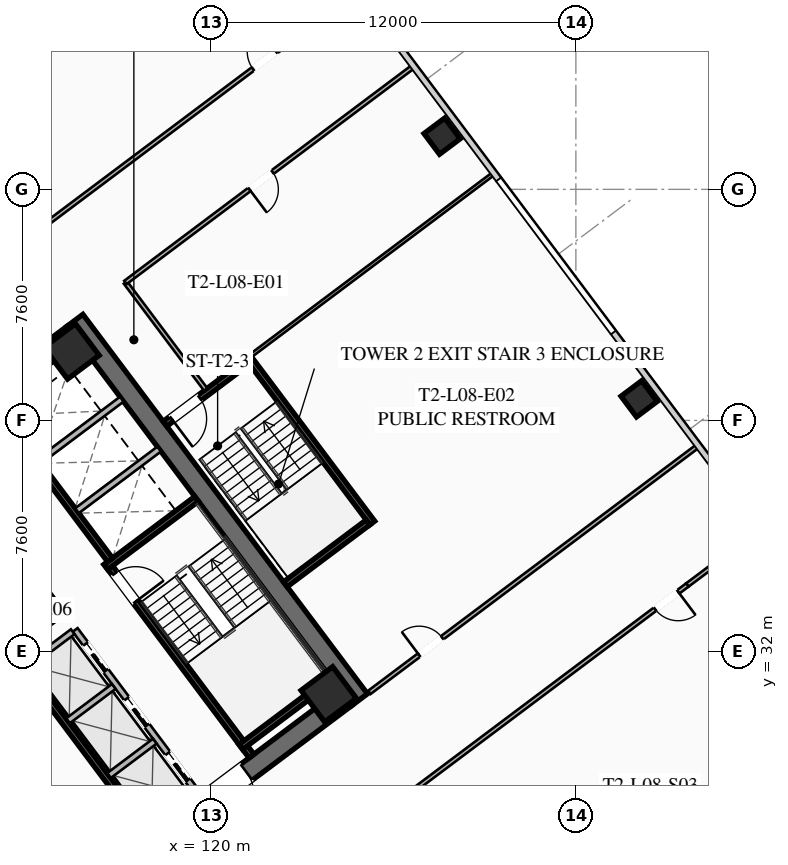
"""IFC4 building model, lengths in metres.
Left out: names, types, materials, properties, quantities, classifications, styles, units other than length and angle.
Written with IfcOpenShell. Run it as: python <this file> out.ifc"""

import sys

from ifc_helpers import new_model, si_unit, direction, frame, frame_2d, origin, origin_2d, place, context, subcontext, project, spatial, rectangle, hollow_rectangle, extrude, element, fill, save


model = new_model("IFC4")
c1 = context("Model", 3, precision=1e-05, world=origin(), true_north=direction((0.0, 1.0)))
c2 = subcontext(c1, "Body", "Model", "MODEL_VIEW")
j1 = project(units=[si_unit("LENGTHUNIT", "METRE"), si_unit("PLANEANGLEUNIT", "RADIAN")], contexts=[c1])
p1 = place(None, origin())
s1 = spatial("IfcSite", under=j1, at=p1, CompositionType="ELEMENT")
p2 = place(p1, origin())
s2 = spatial("IfcBuilding", under=s1, at=p2, CompositionType="ELEMENT")
p3 = place(p2, frame((0.0, 0.0, 35.25)))
s3 = spatial("IfcBuildingStorey", under=s2, at=p3, CompositionType="ELEMENT", Elevation=35.25)
p4 = place(p3, frame((115.524, 42.893, 0.0), z_axis=(0.0, 0.0, 1.0), x_axis=(0.600005007985, -0.799996243986, 0.0)))
e1 = element("IfcWall", 1, at=p4, inside=s3, PredefinedType="SHEAR", context=c2, shape_type="SweptSolid", body=[
    extrude(rectangle(XDim=15.6, YDim=0.65, at=frame_2d((7.8, 0.0))), origin(), (0.0, 0.0, 1.0), 3.55),
])
p5 = place(p3, frame((124.429, 30.478, 0.0), z_axis=(0.0, 0.0, 1.0), x_axis=(-0.799998028465, -0.600002628705, 0.0)))
e2 = element("IfcWall", 2, at=p5, inside=s3, PredefinedType="SHEAR", context=c2, shape_type="SweptSolid", body=[
    extrude(rectangle(XDim=14.86, YDim=0.65, at=frame_2d((7.43, 0.0))), origin(), (0.0, 0.0, 1.0), 3.55),
])
p6 = place(p5, frame((9.13, 0.0, 0.0)))
e3 = element("IfcOpeningElement", 3, at=p6, cuts=e2, PredefinedType="OPENING", context=c2, shape_type="SweptSolid", body=[
    extrude(rectangle(XDim=1.25, YDim=2.25, at=frame_2d((0.625, 1.125))), frame((0.0, 0.335, 0.0), z_axis=(0.0, -1.0, 0.0), x_axis=(1.0, 0.0, 0.0)), (0.0, 0.0, 1.0), 0.67),
])
p7 = place(p5, frame((4.08, 0.0, 0.0)))
e4 = element("IfcOpeningElement", 4, at=p7, cuts=e2, PredefinedType="OPENING", context=c2, shape_type="SweptSolid", body=[
    extrude(rectangle(XDim=1.25, YDim=2.25, at=frame_2d((0.625, 1.125))), frame((0.0, 0.335, 0.0), z_axis=(0.0, -1.0, 0.0), x_axis=(1.0, 0.0, 0.0)), (0.0, 0.0, 1.0), 0.67),
])
p8 = place(p3, frame((103.571, 33.522, 0.0), z_axis=(0.0, 0.0, 1.0), x_axis=(0.799998028465, 0.600002628705, 0.0)))
e5 = element("IfcWall", 5, at=p8, inside=s3, PredefinedType="SHEAR", context=c2, shape_type="SweptSolid", body=[
    extrude(rectangle(XDim=14.86, YDim=0.65, at=frame_2d((7.43, 0.0))), origin(), (0.0, 0.0, 1.0), 3.55),
])
p9 = place(p8, frame((4.48, 0.0, 0.0)))
e6 = element("IfcOpeningElement", 6, at=p9, cuts=e5, PredefinedType="OPENING", context=c2, shape_type="SweptSolid", body=[
    extrude(rectangle(XDim=1.25, YDim=2.25, at=frame_2d((0.625, 1.125))), frame((0.0, 0.335, 0.0), z_axis=(0.0, -1.0, 0.0), x_axis=(1.0, 0.0, 0.0)), (0.0, 0.0, 1.0), 0.67),
])
p10 = place(p8, frame((9.53, 0.0, 0.0)))
e7 = element("IfcOpeningElement", 7, at=p10, cuts=e5, PredefinedType="OPENING", context=c2, shape_type="SweptSolid", body=[
    extrude(rectangle(XDim=1.25, YDim=2.25, at=frame_2d((0.625, 1.125))), frame((0.0, 0.335, 0.0), z_axis=(0.0, -1.0, 0.0), x_axis=(1.0, 0.0, 0.0)), (0.0, 0.0, 1.0), 0.67),
])
for number, where, z_axis, x_axis in (
    (8, (123.87, 30.59, 0.0), (0.0, 0.0, 1.0), (0.8, 0.6, 0.0)),
    (9, (115.41, 41.87, 0.0), (0.0, 0.0, 1.0), (0.8, 0.6, 0.0)),
):
    element("IfcColumn", number, at=place(p3, frame(where, z_axis=z_axis, x_axis=x_axis)), inside=s3, PredefinedType="COLUMN", context=c2, shape_type="SweptSolid", body=[
        extrude(hollow_rectangle(XDim=1.3, YDim=1.3, WallThickness=0.05, at=origin_2d()), origin(), (0.0, 0.0, 1.0), 3.35),
    ])
for number, where, z_axis, x_axis in (
    (10, (134.08, 40.31, 0.0), (0.0, 0.0, 1.0), (0.8, 0.6, 0.0)),
    (11, (127.6, 48.95, 0.0), (0.0, 0.0, 1.0), (0.8, 0.6, 0.0)),
):
    element("IfcColumn", number, at=place(p3, frame(where, z_axis=z_axis, x_axis=x_axis)), inside=s3, PredefinedType="COLUMN", context=c2, shape_type="SweptSolid", body=[
        extrude(hollow_rectangle(XDim=0.85, YDim=0.85, WallThickness=0.035, at=origin_2d()), origin(), (0.0, 0.0, 1.0), 3.35),
    ])
p11 = place(p3, frame((116.56, 34.92, 0.0), z_axis=(0.0, 0.0, 1.0), x_axis=(0.600009827119, -0.799992629566, 0.0)))
e12 = element("IfcWall", 12, at=p11, inside=s3, PredefinedType="SHEAR", context=c2, shape_type="SweptSolid", body=[
    extrude(rectangle(XDim=7.95, YDim=0.2, at=frame_2d((3.975, 0.0))), origin(), (0.0, 0.0, 1.0), 3.35),
])
p12 = place(p11, frame((0.45, 0.0, 0.0)))
e13 = element("IfcOpeningElement", 13, at=p12, cuts=e12, PredefinedType="OPENING", context=c2, shape_type="SweptSolid", body=[
    extrude(rectangle(XDim=1.15, YDim=2.2, at=frame_2d((0.575, 1.1))), frame((0.0, 0.11, 0.0), z_axis=(0.0, -1.0, 0.0), x_axis=(1.0, 0.0, 0.0)), (0.0, 0.0, 1.0), 0.22),
])
for number, where, z_axis, x_axis in (
    (14, (116.54, 34.78, 0.0), (0.0, 0.0, 1.0), (0.8, 0.6, 0.0)),
    (15, (120.98, 28.86, 0.0), (0.0, 0.0, 1.0), (0.8, 0.6, 0.0)),
):
    element("IfcWall", number, at=place(p3, frame(where, z_axis=z_axis, x_axis=x_axis)), inside=s3, PredefinedType="SHEAR", context=c2, shape_type="SweptSolid", body=[
        extrude(rectangle(XDim=3.73, YDim=0.2, at=frame_2d((1.865, 0.0))), origin(), (0.0, 0.0, 1.0), 3.35),
    ])
p13 = place(p3, frame((117.938, 26.016, 0.0), z_axis=(0.0, 0.0, 1.0), x_axis=(-0.600005463273, 0.799995902516, 0.0)))
e16 = element("IfcWall", 16, at=p13, inside=s3, PredefinedType="SHEAR", context=c2, shape_type="SweptSolid", body=[
    extrude(rectangle(XDim=14.3, YDim=0.2, at=frame_2d((7.15, 0.0))), origin(), (0.0, 0.0, 1.0), 3.35),
])
p14 = place(p3, frame((115.13, 23.91, 0.0), z_axis=(0.0, 0.0, 1.0), x_axis=(-0.599975393228, 0.800018454488, 0.0)))
e17 = element("IfcWall", 17, at=p14, inside=s3, PredefinedType="SHEAR", context=c2, shape_type="SweptSolid", body=[
    extrude(rectangle(XDim=6.35, YDim=0.2, at=frame_2d((3.175, 0.0))), origin(), (0.0, 0.0, 1.0), 3.35),
])
p15 = place(p14, frame((4.775, 0.0, 0.0)))
e18 = element("IfcOpeningElement", 18, at=p15, cuts=e17, PredefinedType="OPENING", context=c2, shape_type="SweptSolid", body=[
    extrude(rectangle(XDim=1.3, YDim=2.25, at=frame_2d((0.65, 1.125))), frame((0.0, 0.11, 0.0), z_axis=(0.0, -1.0, 0.0), x_axis=(1.0, 0.0, 0.0)), (0.0, 0.0, 1.0), 0.22),
])
p16 = place(p14, frame((2.775, 0.0, 0.0)))
e19 = element("IfcOpeningElement", 19, at=p16, cuts=e17, PredefinedType="OPENING", context=c2, shape_type="SweptSolid", body=[
    extrude(rectangle(XDim=1.3, YDim=2.25, at=frame_2d((0.65, 1.125))), frame((0.0, 0.11, 0.0), z_axis=(0.0, -1.0, 0.0), x_axis=(1.0, 0.0, 0.0)), (0.0, 0.0, 1.0), 0.22),
])
p17 = place(p14, frame((0.575, 0.0, 0.0)))
e20 = element("IfcOpeningElement", 20, at=p17, cuts=e17, PredefinedType="OPENING", context=c2, shape_type="SweptSolid", body=[
    extrude(rectangle(XDim=1.3, YDim=2.25, at=frame_2d((0.65, 1.125))), frame((0.0, 0.11, 0.0), z_axis=(0.0, -1.0, 0.0), x_axis=(1.0, 0.0, 0.0)), (0.0, 0.0, 1.0), 0.22),
])
p18 = place(p3, frame((112.87, 40.09, 0.0), z_axis=(0.0, 0.0, 1.0), x_axis=(0.599975393228, -0.800018454488, 0.0)))
e21 = element("IfcWall", 21, at=p18, inside=s3, PredefinedType="SHEAR", context=c2, shape_type="SweptSolid", body=[
    extrude(rectangle(XDim=6.35, YDim=0.2, at=frame_2d((3.175, 0.0))), origin(), (0.0, 0.0, 1.0), 3.35),
])
for number, where, z_axis, x_axis in (
    (22, (115.59, 36.63, 0.0), (0.0, 0.0, 1.0), (0.8, 0.6, 0.0)),
    (23, (114.36, 38.27, 0.0), (0.0, 0.0, 1.0), (0.8, 0.6, 0.0)),
):
    element("IfcWall", number, at=place(p3, frame(where, z_axis=z_axis, x_axis=x_axis)), inside=s3, PredefinedType="SOLIDWALL", context=c2, shape_type="SweptSolid", body=[
        extrude(rectangle(XDim=3.38, YDim=0.2, at=frame_2d((1.69, 0.0))), origin(), (0.0, 0.0, 1.0), 3.35),
    ])
p19 = place(p3, frame((119.61, 27.27, 0.0), z_axis=(0.0, 0.0, 1.0), x_axis=(-0.600011488909, 0.79999138319, 0.0)))
e24 = element("IfcWall", 24, at=p19, inside=s3, PredefinedType="SOLIDWALL", context=c2, shape_type="SweptSolid", body=[
    extrude(rectangle(XDim=6.8, YDim=0.2, at=frame_2d((3.4, 0.0))), origin(), (0.0, 0.0, 1.0), 3.35),
])
p20 = place(p19, frame((0.625, 0.0, 0.0)))
e25 = element("IfcOpeningElement", 25, at=p20, cuts=e24, PredefinedType="OPENING", context=c2, shape_type="SweptSolid", body=[
    extrude(rectangle(XDim=1.1, YDim=2.2, at=frame_2d((0.55, 1.1))), frame((0.0, 0.11, 0.0), z_axis=(0.0, -1.0, 0.0), x_axis=(1.0, 0.0, 0.0)), (0.0, 0.0, 1.0), 0.22),
])
p21 = place(p19, frame((2.875, 0.0, 0.0)))
e26 = element("IfcOpeningElement", 26, at=p21, cuts=e24, PredefinedType="OPENING", context=c2, shape_type="SweptSolid", body=[
    extrude(rectangle(XDim=1.1, YDim=2.2, at=frame_2d((0.55, 1.1))), frame((0.0, 0.11, 0.0), z_axis=(0.0, -1.0, 0.0), x_axis=(1.0, 0.0, 0.0)), (0.0, 0.0, 1.0), 0.22),
])
p22 = place(p19, frame((5.125, 0.0, 0.0)))
e27 = element("IfcOpeningElement", 27, at=p22, cuts=e24, PredefinedType="OPENING", context=c2, shape_type="SweptSolid", body=[
    extrude(rectangle(XDim=1.1, YDim=2.2, at=frame_2d((0.55, 1.1))), frame((0.0, 0.11, 0.0), z_axis=(0.0, -1.0, 0.0), x_axis=(1.0, 0.0, 0.0)), (0.0, 0.0, 1.0), 0.22),
])
p23 = place(p3, frame((116.646, 27.922, 0.0), z_axis=(0.0, 0.0, 1.0), x_axis=(0.8, 0.6, 0.0)))
e28 = element("IfcWall", 28, at=p23, inside=s3, PredefinedType="SOLIDWALL", context=c2, shape_type="SweptSolid", body=[
    extrude(rectangle(XDim=1.88, YDim=0.2, at=frame_2d((0.94, 0.0))), origin(), (0.0, 0.0, 1.0), 3.35),
])
p24 = place(p3, frame((115.296, 29.722, 0.0), z_axis=(0.0, 0.0, 1.0), x_axis=(0.799984418148, 0.600020775241, 0.0)))
e29 = element("IfcWall", 29, at=p24, inside=s3, PredefinedType="SOLIDWALL", context=c2, shape_type="SweptSolid", body=[
    extrude(rectangle(XDim=1.88, YDim=0.2, at=frame_2d((0.94, 0.0))), origin(), (0.0, 0.0, 1.0), 3.35),
])
p25 = place(p3, frame((113.946, 31.522, 0.0), z_axis=(0.0, 0.0, 1.0), x_axis=(0.8, 0.6, 0.0)))
e30 = element("IfcWall", 30, at=p25, inside=s3, PredefinedType="SOLIDWALL", context=c2, shape_type="SweptSolid", body=[
    extrude(rectangle(XDim=1.88, YDim=0.2, at=frame_2d((0.94, 0.0))), origin(), (0.0, 0.0, 1.0), 3.35),
])
p26 = place(p3, frame((115.11, 33.27, 0.0), z_axis=(0.0, 0.0, 1.0), x_axis=(-0.600011488909, 0.79999138319, 0.0)))
e31 = element("IfcWall", 31, at=p26, inside=s3, PredefinedType="SOLIDWALL", context=c2, shape_type="SweptSolid", body=[
    extrude(rectangle(XDim=6.8, YDim=0.2, at=frame_2d((3.4, 0.0))), origin(), (0.0, 0.0, 1.0), 3.35),
])
p27 = place(p3, frame((113.526, 32.082, 0.0), z_axis=(0.0, 0.0, 1.0), x_axis=(0.800046745961, 0.599937666993, 0.0)))
e32 = element("IfcWall", 32, at=p27, inside=s3, PredefinedType="SOLIDWALL", context=c2, shape_type="SweptSolid", body=[
    extrude(rectangle(XDim=1.88, YDim=0.2, at=frame_2d((0.94, 0.0))), origin(), (0.0, 0.0, 1.0), 3.35),
])
p28 = place(p3, frame((125.304, 36.228, 0.0), z_axis=(0.0, 0.0, 1.0), x_axis=(-0.59998851072, 0.800008616831, 0.0)))
e33 = element("IfcWall", 33, at=p28, inside=s3, PredefinedType="SHEAR", context=c2, shape_type="SweptSolid", body=[
    extrude(rectangle(XDim=6.8, YDim=0.2, at=frame_2d((3.4, 0.0))), origin(), (0.0, 0.0, 1.0), 3.35),
])
p29 = place(p3, frame((121.204, 41.528, 0.0), z_axis=(0.0, 0.0, 1.0), x_axis=(-0.800017232136, -0.599977023131, 0.0)))
e34 = element("IfcWall", 34, at=p29, inside=s3, PredefinedType="SHEAR", context=c2, shape_type="SweptSolid", body=[
    extrude(rectangle(XDim=3.4, YDim=0.2, at=frame_2d((1.7, 0.0))), origin(), (0.0, 0.0, 1.0), 3.35),
])
p30 = place(p29, frame((1.975, 0.0, 0.0)))
e35 = element("IfcOpeningElement", 35, at=p30, cuts=e34, PredefinedType="OPENING", context=c2, shape_type="SweptSolid", body=[
    extrude(rectangle(XDim=1.15, YDim=2.2, at=frame_2d((0.575, 1.1))), frame((0.0, 0.11, 0.0), z_axis=(0.0, -1.0, 0.0), x_axis=(1.0, 0.0, 0.0)), (0.0, 0.0, 1.0), 0.22),
])
p31 = place(p3, frame((122.444, 34.208, 0.0), z_axis=(0.0, 0.0, 1.0), x_axis=(0.79999138319, 0.600011488909, 0.0)))
e36 = element("IfcWall", 36, at=p31, inside=s3, PredefinedType="SHEAR", context=c2, shape_type="SweptSolid", body=[
    extrude(rectangle(XDim=3.4, YDim=0.2, at=frame_2d((1.7, 0.0))), origin(), (0.0, 0.0, 1.0), 3.35),
])
p32 = place(p3, frame((119.824, 40.618, 0.0), z_axis=(0.0, 0.0, 1.0), x_axis=(-0.599982243973, 0.800013316712, 0.0)))
e37 = element("IfcWall", 37, at=p32, inside=s3, PredefinedType="PARTITIONING", context=c2, shape_type="SweptSolid", body=[
    extrude(rectangle(XDim=4.4, YDim=0.135, at=frame_2d((2.2, 0.0))), origin(), (0.0, 0.0, 1.0), 2.703),
])
p33 = place(p3, frame((98.516, 34.012, 0.0), z_axis=(0.0, 0.0, 1.0), x_axis=(0.799998035726, 0.600002619023, 0.0)))
e38 = element("IfcWall", 38, at=p33, inside=s3, PredefinedType="PARTITIONING", context=c2, shape_type="SweptSolid", body=[
    extrude(rectangle(XDim=29.83, YDim=0.135, at=frame_2d((14.915, 0.0))), origin(), (0.0, 0.0, 1.0), 2.703),
])
p34 = place(p33, frame((0.3, 0.0, 0.0)))
e39 = element("IfcOpeningElement", 39, at=p34, cuts=e38, PredefinedType="OPENING", context=c2, shape_type="SweptSolid", body=[
    extrude(rectangle(XDim=0.95, YDim=2.05, at=frame_2d((0.475, 1.025))), frame((0.0, 0.077, 0.0), z_axis=(0.0, -1.0, 0.0), x_axis=(1.0, 0.0, 0.0)), (0.0, 0.0, 1.0), 0.155),
])
p35 = place(p33, frame((10.829, 0.0, 0.0)))
e40 = element("IfcOpeningElement", 40, at=p35, cuts=e38, PredefinedType="OPENING", context=c2, shape_type="SweptSolid", body=[
    extrude(rectangle(XDim=0.95, YDim=2.05, at=frame_2d((0.475, 1.025))), frame((0.0, 0.077, 0.0), z_axis=(0.0, -1.0, 0.0), x_axis=(1.0, 0.0, 0.0)), (0.0, 0.0, 1.0), 0.155),
])
p36 = place(p33, frame((28.58, 0.0, 0.0)))
e41 = element("IfcOpeningElement", 41, at=p36, cuts=e38, PredefinedType="OPENING", context=c2, shape_type="SweptSolid", body=[
    extrude(rectangle(XDim=0.95, YDim=2.05, at=frame_2d((0.475, 1.025))), frame((0.0, 0.077, 0.0), z_axis=(0.0, -1.0, 0.0), x_axis=(1.0, 0.0, 0.0)), (0.0, 0.0, 1.0), 0.155),
])
p37 = place(p3, frame((135.67, 34.19, 0.0), z_axis=(0.0, 0.0, 1.0), x_axis=(-0.800000982127, -0.599998690494, 0.0)))
e42 = element("IfcWall", 42, at=p37, inside=s3, PredefinedType="PARTITIONING", context=c2, shape_type="SweptSolid", body=[
    extrude(rectangle(XDim=29.83, YDim=0.135, at=frame_2d((14.915, 0.0))), origin(), (0.0, 0.0, 1.0), 2.703),
])
p38 = place(p37, frame((28.5, 0.0, 0.0)))
e43 = element("IfcOpeningElement", 43, at=p38, cuts=e42, PredefinedType="OPENING", context=c2, shape_type="SweptSolid", body=[
    extrude(rectangle(XDim=0.95, YDim=2.05, at=frame_2d((0.475, 1.025))), frame((0.0, 0.077, 0.0), z_axis=(0.0, -1.0, 0.0), x_axis=(1.0, 0.0, 0.0)), (0.0, 0.0, 1.0), 0.155),
])
p39 = place(p37, frame((18.075, 0.0, 0.0)))
e44 = element("IfcOpeningElement", 44, at=p39, cuts=e42, PredefinedType="OPENING", context=c2, shape_type="SweptSolid", body=[
    extrude(rectangle(XDim=0.95, YDim=2.05, at=frame_2d((0.475, 1.025))), frame((0.0, 0.077, 0.0), z_axis=(0.0, -1.0, 0.0), x_axis=(1.0, 0.0, 0.0)), (0.0, 0.0, 1.0), 0.155),
])
p40 = place(p37, frame((0.38, 0.0, 0.0)))
e45 = element("IfcOpeningElement", 45, at=p40, cuts=e42, PredefinedType="OPENING", context=c2, shape_type="SweptSolid", body=[
    extrude(rectangle(XDim=0.95, YDim=2.05, at=frame_2d((0.475, 1.025))), frame((0.0, 0.077, 0.0), z_axis=(0.0, -1.0, 0.0), x_axis=(1.0, 0.0, 0.0)), (0.0, 0.0, 1.0), 0.155),
])
p41 = place(p3, frame((135.67, 34.19, 0.0), z_axis=(0.0, 0.0, 1.0), x_axis=(0.799990331366, 0.600012891296, 0.0)))
e46 = element("IfcWall", 46, at=p41, inside=s3, PredefinedType="PARTITIONING", context=c2, shape_type="SweptSolid", body=[
    extrude(rectangle(XDim=3.03, YDim=0.135, at=frame_2d((1.515, 0.0))), origin(), (0.0, 0.0, 1.0), 2.703),
])
p42 = place(p3, frame((126.664, 51.248, 0.0), z_axis=(0.0, 0.0, 1.0), x_axis=(-0.799995055373, -0.600006592779, 0.0)))
e47 = element("IfcWall", 47, at=p42, inside=s3, PredefinedType="PARTITIONING", context=c2, shape_type="SweptSolid", body=[
    extrude(rectangle(XDim=11.85, YDim=0.135, at=frame_2d((5.925, 0.0))), origin(), (0.0, 0.0, 1.0), 2.703),
])
p43 = place(p42, frame((5.8, 0.0, 0.0)))
e48 = element("IfcOpeningElement", 48, at=p43, cuts=e47, PredefinedType="OPENING", context=c2, shape_type="SweptSolid", body=[
    extrude(rectangle(XDim=0.95, YDim=2.05, at=frame_2d((0.475, 1.025))), frame((0.0, 0.077, 0.0), z_axis=(0.0, -1.0, 0.0), x_axis=(1.0, 0.0, 0.0)), (0.0, 0.0, 1.0), 0.155),
])
p44 = place(p3, frame((125.208, 30.656, 0.0), z_axis=(0.0, 0.0, 1.0), x_axis=(0.799995666112, 0.600005778473, 0.0)))
e49 = element("IfcWall", 49, at=p44, inside=s3, PredefinedType="PARTITIONING", context=c2, shape_type="SweptSolid", body=[
    extrude(rectangle(XDim=13.52, YDim=0.135, at=frame_2d((6.76, 0.0))), origin(), (0.0, 0.0, 1.0), 2.703),
])
p45 = place(p44, frame((2.045, 0.0, 0.0)))
e50 = element("IfcOpeningElement", 50, at=p45, cuts=e49, PredefinedType="OPENING", context=c2, shape_type="SweptSolid", body=[
    extrude(rectangle(XDim=0.95, YDim=2.05, at=frame_2d((0.475, 1.025))), frame((0.0, 0.077, 0.0), z_axis=(0.0, -1.0, 0.0), x_axis=(1.0, 0.0, 0.0)), (0.0, 0.0, 1.0), 0.155),
])
p46 = place(p3, frame((129.304, 47.728, 0.0), z_axis=(0.0, 0.0, 1.0), x_axis=(-0.8, -0.6, 0.0)))
e51 = element("IfcWall", 51, at=p46, inside=s3, PredefinedType="PARTITIONING", context=c2, shape_type="SweptSolid", body=[
    extrude(rectangle(XDim=10.0, YDim=0.11, at=frame_2d((5.0, 0.0))), origin(), (0.0, 0.0, 1.0), 2.703),
])
p47 = place(p7, origin())
e52 = element("IfcDoor", 52, at=p47, inside=s3, OperationType="SINGLE_SWING_RIGHT", PredefinedType="DOOR", context=c2, shape_type="SweptSolid", body=[
    extrude(rectangle(XDim=1.25, YDim=2.25, at=frame_2d((0.625, 1.125))), frame((0.0, 0.025, 0.0), z_axis=(0.0, -1.0, 0.0), x_axis=(1.0, 0.0, 0.0)), (0.0, 0.0, 1.0), 0.05),
])
fill(e4, e52)
p48 = place(p12, origin())
e53 = element("IfcDoor", 53, at=p48, inside=s3, OperationType="SINGLE_SWING_RIGHT", PredefinedType="DOOR", context=c2, shape_type="SweptSolid", body=[
    extrude(rectangle(XDim=1.15, YDim=2.2, at=frame_2d((0.575, 1.1))), frame((0.0, 0.025, 0.0), z_axis=(0.0, -1.0, 0.0), x_axis=(1.0, 0.0, 0.0)), (0.0, 0.0, 1.0), 0.05),
])
fill(e13, e53)
p49 = place(p30, origin())
e54 = element("IfcDoor", 54, at=p49, inside=s3, OperationType="SINGLE_SWING_RIGHT", PredefinedType="DOOR", context=c2, shape_type="SweptSolid", body=[
    extrude(rectangle(XDim=1.15, YDim=2.2, at=frame_2d((0.575, 1.1))), frame((0.0, 0.025, 0.0), z_axis=(0.0, -1.0, 0.0), x_axis=(1.0, 0.0, 0.0)), (0.0, 0.0, 1.0), 0.05),
])
fill(e35, e54)
p50 = place(p36, origin())
e55 = element("IfcDoor", 55, at=p50, inside=s3, OperationType="SINGLE_SWING_RIGHT", PredefinedType="DOOR", context=c2, shape_type="SweptSolid", body=[
    extrude(rectangle(XDim=0.95, YDim=2.05, at=frame_2d((0.475, 1.025))), frame((0.0, 0.025, 0.0), z_axis=(0.0, -1.0, 0.0), x_axis=(1.0, 0.0, 0.0)), (0.0, 0.0, 1.0), 0.05),
])
fill(e41, e55)
p51 = place(p40, origin())
e56 = element("IfcDoor", 56, at=p51, inside=s3, OperationType="SINGLE_SWING_LEFT", PredefinedType="DOOR", context=c2, shape_type="SweptSolid", body=[
    extrude(rectangle(XDim=0.95, YDim=2.05, at=frame_2d((0.475, 1.025))), frame((0.0, 0.025, 0.0), z_axis=(0.0, -1.0, 0.0), x_axis=(1.0, 0.0, 0.0)), (0.0, 0.0, 1.0), 0.05),
])
fill(e45, e56)
p52 = place(p43, origin())
e57 = element("IfcDoor", 57, at=p52, inside=s3, OperationType="SINGLE_SWING_RIGHT", PredefinedType="DOOR", context=c2, shape_type="SweptSolid", body=[
    extrude(rectangle(XDim=0.95, YDim=2.05, at=frame_2d((0.475, 1.025))), frame((0.0, 0.025, 0.0), z_axis=(0.0, -1.0, 0.0), x_axis=(1.0, 0.0, 0.0)), (0.0, 0.0, 1.0), 0.05),
])
fill(e48, e57)
p53 = place(p45, origin())
e58 = element("IfcDoor", 58, at=p53, inside=s3, OperationType="SINGLE_SWING_LEFT", PredefinedType="DOOR", context=c2, shape_type="SweptSolid", body=[
    extrude(rectangle(XDim=0.95, YDim=2.05, at=frame_2d((0.475, 1.025))), frame((0.0, 0.025, 0.0), z_axis=(0.0, -1.0, 0.0), x_axis=(1.0, 0.0, 0.0)), (0.0, 0.0, 1.0), 0.05),
])
fill(e50, e58)
p54 = place(p20, origin())
e59 = element("IfcDoor", 59, at=p54, inside=s3, OperationType="SLIDING_TO_LEFT", PredefinedType="DOOR", context=c2, shape_type="SweptSolid", body=[
    extrude(rectangle(XDim=1.1, YDim=2.2, at=frame_2d((0.55, 1.1))), frame((0.0, 0.025, 0.0), z_axis=(0.0, -1.0, 0.0), x_axis=(1.0, 0.0, 0.0)), (0.0, 0.0, 1.0), 0.05),
])
fill(e25, e59)
p55 = place(p21, origin())
e60 = element("IfcDoor", 60, at=p55, inside=s3, OperationType="SLIDING_TO_LEFT", PredefinedType="DOOR", context=c2, shape_type="SweptSolid", body=[
    extrude(rectangle(XDim=1.1, YDim=2.2, at=frame_2d((0.55, 1.1))), frame((0.0, 0.025, 0.0), z_axis=(0.0, -1.0, 0.0), x_axis=(1.0, 0.0, 0.0)), (0.0, 0.0, 1.0), 0.05),
])
fill(e26, e60)
p56 = place(p22, origin())
e61 = element("IfcDoor", 61, at=p56, inside=s3, OperationType="SLIDING_TO_LEFT", PredefinedType="DOOR", context=c2, shape_type="SweptSolid", body=[
    extrude(rectangle(XDim=1.1, YDim=2.2, at=frame_2d((0.55, 1.1))), frame((0.0, 0.025, 0.0), z_axis=(0.0, -1.0, 0.0), x_axis=(1.0, 0.0, 0.0)), (0.0, 0.0, 1.0), 0.05),
])
fill(e27, e61)
save(model, sys.argv[1])
